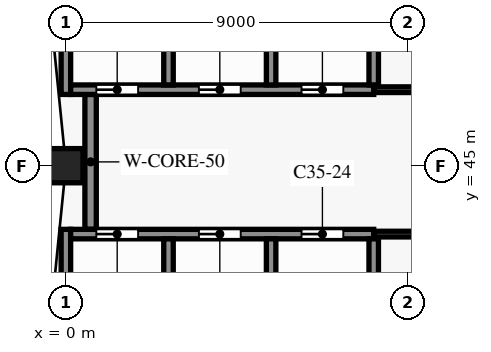
"""IFC4 building model, lengths in metres.
Left out: names, types, materials, properties, quantities, classifications, styles, units other than length and angle.
Written with IfcOpenShell. Run it as: python <this file> out.ifc"""

import sys

from ifc_helpers import new_model, si_unit, direction, frame, frame_2d, origin, origin_2d, place, context, subcontext, project, spatial, rectangle, extrude, element, fill, save


model = new_model("IFC4")
c1 = context("Model", 3, precision=1e-05, world=origin(), true_north=direction((0.0, 1.0)))
c2 = subcontext(c1, "Body", "Model", "MODEL_VIEW")
j1 = project(units=[si_unit("LENGTHUNIT", "METRE"), si_unit("PLANEANGLEUNIT", "RADIAN")], contexts=[c1])
p1 = place(None, origin())
s1 = spatial("IfcSite", under=j1, at=p1, CompositionType="ELEMENT")
p2 = place(p1, origin())
s2 = spatial("IfcBuilding", under=s1, at=p2, CompositionType="ELEMENT")
p3 = place(p2, frame((0.0, 0.0, 256.2)))
s3 = spatial("IfcBuildingStorey", under=s2, at=p3, CompositionType="ELEMENT", Elevation=256.2)
p4 = place(p3, frame((0.0, 45.0, 0.0), z_axis=(0.0, 0.0, 1.0), x_axis=(0.0, -1.0, 0.0)))
e1 = element("IfcColumn", 1, at=p4, inside=s3, PredefinedType="COLUMN", context=c2, shape_type="SweptSolid", body=[
    extrude(rectangle(XDim=0.9, YDim=0.9, at=origin_2d()), origin(), (0.0, 0.0, 1.0), 3.8),
])
p5 = place(p3, frame((8.1, 43.2, 0.0), z_axis=(0.0, 0.0, 1.0), x_axis=(1.0, 0.0, 0.0)))
e2 = element("IfcWall", 2, at=p5, inside=s3, PredefinedType="PARTITIONING", context=c2, shape_type="SweptSolid", body=[
    extrude(rectangle(XDim=16.125, YDim=0.15, at=frame_2d((8.062, 0.0))), origin(), (0.0, 0.0, 1.0), 3.5),
])
p6 = place(p5, frame((1.925, 0.0, 0.0)))
e3 = element("IfcOpeningElement", 3, at=p6, cuts=e2, PredefinedType="OPENING", context=c2, shape_type="SweptSolid", body=[
    extrude(rectangle(XDim=0.9, YDim=2.1, at=frame_2d((0.45, 1.05))), frame((0.0, 0.085, 0.0), z_axis=(0.0, -1.0, 0.0), x_axis=(1.0, 0.0, 0.0)), (0.0, 0.0, 1.0), 0.17),
])
p7 = place(p5, frame((10.025, 0.0, 0.0)))
e4 = element("IfcOpeningElement", 4, at=p7, cuts=e2, PredefinedType="OPENING", context=c2, shape_type="SweptSolid", body=[
    extrude(rectangle(XDim=0.9, YDim=2.1, at=frame_2d((0.45, 1.05))), frame((0.0, 0.085, 0.0), z_axis=(0.0, -1.0, 0.0), x_axis=(1.0, 0.0, 0.0)), (0.0, 0.0, 1.0), 0.17),
])
p8 = place(p3, frame((0.125, 43.2, 0.0), z_axis=(0.0, 0.0, 1.0), x_axis=(1.0, 0.0, 0.0)))
e5 = element("IfcWall", 5, at=p8, inside=s3, PredefinedType="SHEAR", context=c2, shape_type="SweptSolid", body=[
    extrude(rectangle(XDim=7.975, YDim=0.25, at=frame_2d((3.988, 0.0))), origin(), (0.0, 0.0, 1.0), 3.5),
])
p9 = place(p8, frame((0.675, 0.0, 0.0)))
e6 = element("IfcOpeningElement", 6, at=p9, cuts=e5, PredefinedType="OPENING", context=c2, shape_type="SweptSolid", body=[
    extrude(rectangle(XDim=1.1, YDim=2.1, at=frame_2d((0.55, 1.05))), frame((0.0, 0.135, 0.0), z_axis=(0.0, -1.0, 0.0), x_axis=(1.0, 0.0, 0.0)), (0.0, 0.0, 1.0), 0.27),
])
p10 = place(p8, frame((3.375, 0.0, 0.0)))
e7 = element("IfcOpeningElement", 7, at=p10, cuts=e5, PredefinedType="OPENING", context=c2, shape_type="SweptSolid", body=[
    extrude(rectangle(XDim=1.1, YDim=2.1, at=frame_2d((0.55, 1.05))), frame((0.0, 0.135, 0.0), z_axis=(0.0, -1.0, 0.0), x_axis=(1.0, 0.0, 0.0)), (0.0, 0.0, 1.0), 0.27),
])
p11 = place(p8, frame((6.075, 0.0, 0.0)))
e8 = element("IfcOpeningElement", 8, at=p11, cuts=e5, PredefinedType="OPENING", context=c2, shape_type="SweptSolid", body=[
    extrude(rectangle(XDim=1.1, YDim=2.1, at=frame_2d((0.55, 1.05))), frame((0.0, 0.135, 0.0), z_axis=(0.0, -1.0, 0.0), x_axis=(1.0, 0.0, 0.0)), (0.0, 0.0, 1.0), 0.27),
])
p12 = place(p3, frame((8.1, 47.0, 0.0), z_axis=(0.0, 0.0, 1.0), x_axis=(1.0, 0.0, 0.0)))
e9 = element("IfcWall", 9, at=p12, inside=s3, PredefinedType="PARTITIONING", context=c2, shape_type="SweptSolid", body=[
    extrude(rectangle(XDim=13.5, YDim=0.15, at=frame_2d((6.75, 0.0))), origin(), (0.0, 0.0, 1.0), 3.5),
])
p13 = place(p12, frame((1.525, 0.0, 0.0)))
e10 = element("IfcOpeningElement", 10, at=p13, cuts=e9, PredefinedType="OPENING", context=c2, shape_type="SweptSolid", body=[
    extrude(rectangle(XDim=0.9, YDim=2.1, at=frame_2d((0.45, 1.05))), frame((0.0, 0.085, 0.0), z_axis=(0.0, -1.0, 0.0), x_axis=(1.0, 0.0, 0.0)), (0.0, 0.0, 1.0), 0.17),
])
p14 = place(p12, frame((8.275, 0.0, 0.0)))
e11 = element("IfcOpeningElement", 11, at=p14, cuts=e9, PredefinedType="OPENING", context=c2, shape_type="SweptSolid", body=[
    extrude(rectangle(XDim=0.9, YDim=2.1, at=frame_2d((0.45, 1.05))), frame((0.0, 0.085, 0.0), z_axis=(0.0, -1.0, 0.0), x_axis=(1.0, 0.0, 0.0)), (0.0, 0.0, 1.0), 0.17),
])
p15 = place(p3, frame((0.125, 47.0, 0.0), z_axis=(0.0, 0.0, 1.0), x_axis=(1.0, 0.0, 0.0)))
e12 = element("IfcWall", 12, at=p15, inside=s3, PredefinedType="SHEAR", context=c2, shape_type="SweptSolid", body=[
    extrude(rectangle(XDim=7.975, YDim=0.25, at=frame_2d((3.988, 0.0))), origin(), (0.0, 0.0, 1.0), 3.5),
])
p16 = place(p15, frame((0.675, 0.0, 0.0)))
e13 = element("IfcOpeningElement", 13, at=p16, cuts=e12, PredefinedType="OPENING", context=c2, shape_type="SweptSolid", body=[
    extrude(rectangle(XDim=1.1, YDim=2.1, at=frame_2d((0.55, 1.05))), frame((0.0, 0.135, 0.0), z_axis=(0.0, -1.0, 0.0), x_axis=(1.0, 0.0, 0.0)), (0.0, 0.0, 1.0), 0.27),
])
p17 = place(p15, frame((3.375, 0.0, 0.0)))
e14 = element("IfcOpeningElement", 14, at=p17, cuts=e12, PredefinedType="OPENING", context=c2, shape_type="SweptSolid", body=[
    extrude(rectangle(XDim=1.1, YDim=2.1, at=frame_2d((0.55, 1.05))), frame((0.0, 0.135, 0.0), z_axis=(0.0, -1.0, 0.0), x_axis=(1.0, 0.0, 0.0)), (0.0, 0.0, 1.0), 0.27),
])
p18 = place(p15, frame((6.075, 0.0, 0.0)))
e15 = element("IfcOpeningElement", 15, at=p18, cuts=e12, PredefinedType="OPENING", context=c2, shape_type="SweptSolid", body=[
    extrude(rectangle(XDim=1.1, YDim=2.1, at=frame_2d((0.55, 1.05))), frame((0.0, 0.135, 0.0), z_axis=(0.0, -1.0, 0.0), x_axis=(1.0, 0.0, 0.0)), (0.0, 0.0, 1.0), 0.27),
])
p19 = place(p3, frame((0.0, 40.0, 0.0), z_axis=(0.0, 0.0, 1.0), x_axis=(0.0, 1.0, 0.0)))
e16 = element("IfcWall", 16, at=p19, inside=s3, PredefinedType="SHEAR", context=c2, shape_type="SweptSolid", body=[
    extrude(rectangle(XDim=3.325, YDim=0.25, at=frame_2d((1.663, 0.0))), origin(), (0.0, 0.0, 1.0), 3.5),
])
p20 = place(p3, frame((0.0, 46.875, 0.0), z_axis=(0.0, 0.0, 1.0), x_axis=(0.0, 1.0, 0.0)))
e17 = element("IfcWall", 17, at=p20, inside=s3, PredefinedType="SHEAR", context=c2, shape_type="SweptSolid", body=[
    extrude(rectangle(XDim=3.475, YDim=0.25, at=frame_2d((1.738, 0.0))), origin(), (0.0, 0.0, 1.0), 3.5),
])
p21 = place(p3, frame((0.65, 43.325, 0.0), z_axis=(0.0, 0.0, 1.0), x_axis=(0.0, 1.0, 0.0)))
e18 = element("IfcWall", 18, at=p21, inside=s3, PredefinedType="SHEAR", context=c2, shape_type="SweptSolid", body=[
    extrude(rectangle(XDim=3.55, YDim=0.3, at=frame_2d((1.775, 0.0))), origin(), (0.0, 0.0, 1.0), 3.5),
])
for number, where, z_axis, x_axis in (
    (19, (2.7, 40.125, 0.0), (0.0, 0.0, 1.0), (0.0, 1.0, 0.0)),
    (20, (2.7, 47.125, 0.0), (0.0, 0.0, 1.0), (0.0, 1.0, 0.0)),
    (21, (5.4, 40.125, 0.0), (0.0, 0.0, 1.0), (0.0, 1.0, 0.0)),
    (22, (5.4, 47.125, 0.0), (0.0, 0.0, 1.0), (0.0, 1.0, 0.0)),
    (23, (8.1, 40.125, 0.0), (0.0, 0.0, 1.0), (0.0, 1.0, 0.0)),
):
    element("IfcWall", number, at=place(p3, frame(where, z_axis=z_axis, x_axis=x_axis)), inside=s3, PredefinedType="SHEAR", context=c2, shape_type="SweptSolid", body=[
        extrude(rectangle(XDim=2.95, YDim=0.25, at=frame_2d((1.475, 0.0))), origin(), (0.0, 0.0, 1.0), 3.5),
    ])
p22 = place(p3, frame((8.1, 47.125, 0.0), z_axis=(0.0, 0.0, 1.0), x_axis=(0.0, 1.0, 0.0)))
e24 = element("IfcWall", 24, at=p22, inside=s3, PredefinedType="SHEAR", context=c2, shape_type="SweptSolid", body=[
    extrude(rectangle(XDim=3.075, YDim=0.25, at=frame_2d((1.538, 0.0))), origin(), (0.0, 0.0, 1.0), 3.5),
])
p23 = place(p9, origin())
e25 = element("IfcDoor", 25, at=p23, inside=s3, OperationType="DOUBLE_DOOR_SLIDING", PredefinedType="DOOR", context=c2, shape_type="SweptSolid", body=[
    extrude(rectangle(XDim=1.1, YDim=2.1, at=frame_2d((0.55, 1.05))), frame((0.0, 0.025, 0.0), z_axis=(0.0, -1.0, 0.0), x_axis=(1.0, 0.0, 0.0)), (0.0, 0.0, 1.0), 0.05),
])
fill(e6, e25)
p24 = place(p10, origin())
e26 = element("IfcDoor", 26, at=p24, inside=s3, OperationType="DOUBLE_DOOR_SLIDING", PredefinedType="DOOR", context=c2, shape_type="SweptSolid", body=[
    extrude(rectangle(XDim=1.1, YDim=2.1, at=frame_2d((0.55, 1.05))), frame((0.0, 0.025, 0.0), z_axis=(0.0, -1.0, 0.0), x_axis=(1.0, 0.0, 0.0)), (0.0, 0.0, 1.0), 0.05),
])
fill(e7, e26)
p25 = place(p11, origin())
e27 = element("IfcDoor", 27, at=p25, inside=s3, OperationType="DOUBLE_DOOR_SLIDING", PredefinedType="DOOR", context=c2, shape_type="SweptSolid", body=[
    extrude(rectangle(XDim=1.1, YDim=2.1, at=frame_2d((0.55, 1.05))), frame((0.0, 0.025, 0.0), z_axis=(0.0, -1.0, 0.0), x_axis=(1.0, 0.0, 0.0)), (0.0, 0.0, 1.0), 0.05),
])
fill(e8, e27)
p26 = place(p16, origin())
e28 = element("IfcDoor", 28, at=p26, inside=s3, OperationType="DOUBLE_DOOR_SLIDING", PredefinedType="DOOR", context=c2, shape_type="SweptSolid", body=[
    extrude(rectangle(XDim=1.1, YDim=2.1, at=frame_2d((0.55, 1.05))), frame((0.0, 0.025, 0.0), z_axis=(0.0, -1.0, 0.0), x_axis=(1.0, 0.0, 0.0)), (0.0, 0.0, 1.0), 0.05),
])
fill(e13, e28)
p27 = place(p17, origin())
e29 = element("IfcDoor", 29, at=p27, inside=s3, OperationType="DOUBLE_DOOR_SLIDING", PredefinedType="DOOR", context=c2, shape_type="SweptSolid", body=[
    extrude(rectangle(XDim=1.1, YDim=2.1, at=frame_2d((0.55, 1.05))), frame((0.0, 0.025, 0.0), z_axis=(0.0, -1.0, 0.0), x_axis=(1.0, 0.0, 0.0)), (0.0, 0.0, 1.0), 0.05),
])
fill(e14, e29)
p28 = place(p18, origin())
e30 = element("IfcDoor", 30, at=p28, inside=s3, OperationType="DOUBLE_DOOR_SLIDING", PredefinedType="DOOR", context=c2, shape_type="SweptSolid", body=[
    extrude(rectangle(XDim=1.1, YDim=2.1, at=frame_2d((0.55, 1.05))), frame((0.0, 0.025, 0.0), z_axis=(0.0, -1.0, 0.0), x_axis=(1.0, 0.0, 0.0)), (0.0, 0.0, 1.0), 0.05),
])
fill(e15, e30)
save(model, sys.argv[1])
